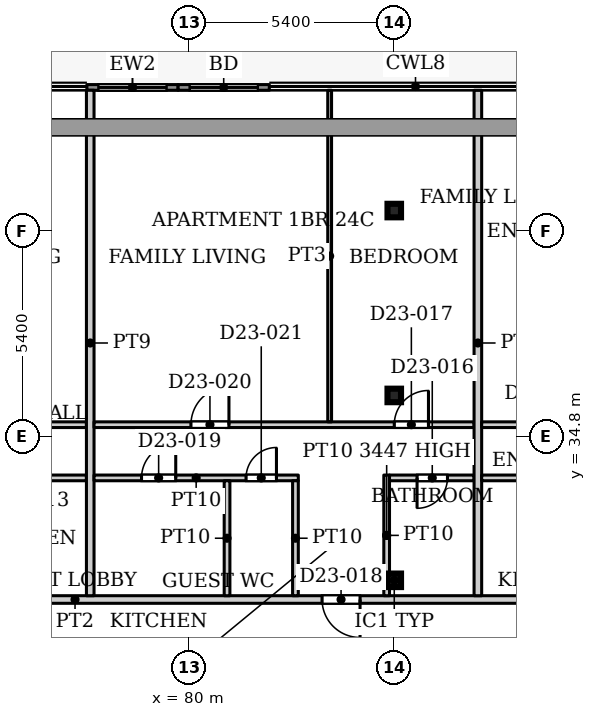
"""IFC4 building model, lengths in metres.
Left out: names, types, materials, properties, quantities, classifications, styles, units other than length and angle.
Written with IfcOpenShell. Run it as: python <this file> out.ifc"""

import sys

from ifc_helpers import new_model, si_unit, direction, frame, frame_2d, origin, origin_2d, place, context, subcontext, project, spatial, rectangle, hollow_rectangle, extrude, source, transform, mapped, element, fill, save


model = new_model("IFC4")
c1 = context("Model", 3, precision=1e-05, world=origin(), true_north=direction((0.0, 1.0)))
c2 = subcontext(c1, "Body", "Model", "MODEL_VIEW")
j1 = project(units=[si_unit("LENGTHUNIT", "METRE"), si_unit("PLANEANGLEUNIT", "RADIAN")], contexts=[c1])
p1 = place(None, origin())
s1 = spatial("IfcSite", under=j1, at=p1, CompositionType="ELEMENT")
p2 = place(p1, origin())
s2 = spatial("IfcBuilding", under=s1, at=p2, CompositionType="ELEMENT")
p3 = place(p2, frame((0.0, 0.0, 105.8)))
s3 = spatial("IfcBuildingStorey", under=s2, at=p3, CompositionType="ELEMENT", Elevation=105.8)
for number, where, z_axis, x_axis in (
    (1, (85.4, 31.005, 0.0), (0.0, 0.0, 1.0), (1.0, 0.0, 0.0)),
    (2, (85.4, 35.87, 0.0), (0.0, 0.0, 1.0), (1.0, 0.0, 0.0)),
    (3, (85.4, 40.735, 0.0), (0.0, 0.0, 1.0), (1.0, 0.0, 0.0)),
):
    element("IfcColumn", number, at=place(p3, frame(where, z_axis=z_axis, x_axis=x_axis)), inside=s3, PredefinedType="COLUMN", context=c2, shape_type="SweptSolid", body=[
        extrude(hollow_rectangle(XDim=0.356, YDim=0.356, WallThickness=0.016, InnerFilletRadius=0.016, OuterFilletRadius=0.032, at=origin_2d()), origin(), (0.0, 0.0, 1.0), 3.9),
    ])
p4 = place(p3, frame((77.312, 43.975, 0.0), z_axis=(0.0, 0.0, 1.0), x_axis=(1.0, 0.0, 0.0)))
e4 = element("IfcWall", 4, at=p4, inside=s3, PredefinedType="SOLIDWALL", context=c2, shape_type="SweptSolid", body=[
    extrude(rectangle(XDim=2.4, YDim=0.15, at=frame_2d((1.2, 0.0))), origin(), (0.0, 0.0, 1.0), 3.75),
])
p5 = place(p4, frame((0.3, 0.0, 0.0)))
e5 = element("IfcOpeningElement", 5, at=p5, cuts=e4, PredefinedType="OPENING", context=c2, shape_type="SweptSolid", body=[
    extrude(rectangle(XDim=1.8, YDim=2.4, at=frame_2d((0.9, 1.2))), frame((0.0, 0.085, 0.0), z_axis=(0.0, -1.0, 0.0), x_axis=(1.0, 0.0, 0.0)), (0.0, 0.0, 1.0), 0.17),
])
p6 = place(p3, frame((79.712, 43.975, 0.0), z_axis=(0.0, 0.0, 1.0), x_axis=(1.0, 0.0, 0.0)))
e6 = element("IfcWall", 6, at=p6, inside=s3, PredefinedType="SOLIDWALL", context=c2, shape_type="SweptSolid", body=[
    extrude(rectangle(XDim=2.4, YDim=0.15, at=frame_2d((1.2, 0.0))), origin(), (0.0, 0.0, 1.0), 3.75),
])
p7 = place(p6, frame((0.3, 0.0, 0.0)))
e7 = element("IfcOpeningElement", 7, at=p7, cuts=e6, PredefinedType="OPENING", context=c2, shape_type="SweptSolid", body=[
    extrude(rectangle(XDim=1.8, YDim=2.4, at=frame_2d((0.9, 1.2))), frame((0.0, 0.085, 0.0), z_axis=(0.0, -1.0, 0.0), x_axis=(1.0, 0.0, 0.0)), (0.0, 0.0, 1.0), 0.17),
])
p8 = place(p3, frame((55.9, 30.5, 0.0), z_axis=(0.0, 0.0, 1.0), x_axis=(1.0, 0.0, 0.0)))
e8 = element("IfcWall", 8, at=p8, inside=s3, PredefinedType="PARTITIONING", context=c2, shape_type="SweptSolid", body=[
    extrude(rectangle(XDim=42.2, YDim=0.2, at=frame_2d((21.1, 0.0))), origin(), (0.0, 0.0, 1.0), 3.6),
])
p9 = place(p8, frame((10.35, 0.0, 0.0)))
e9 = element("IfcOpeningElement", 9, at=p9, cuts=e8, PredefinedType="OPENING", context=c2, shape_type="SweptSolid", body=[
    extrude(rectangle(XDim=1.0, YDim=2.1, at=frame_2d((0.5, 1.05))), frame((0.0, 0.11, 0.0), z_axis=(0.0, -1.0, 0.0), x_axis=(1.0, 0.0, 0.0)), (0.0, 0.0, 1.0), 0.22),
])
p10 = place(p8, frame((16.65, 0.0, 0.0)))
e10 = element("IfcOpeningElement", 10, at=p10, cuts=e8, PredefinedType="OPENING", context=c2, shape_type="SweptSolid", body=[
    extrude(rectangle(XDim=1.0, YDim=2.1, at=frame_2d((0.5, 1.05))), frame((0.0, 0.11, 0.0), z_axis=(0.0, -1.0, 0.0), x_axis=(1.0, 0.0, 0.0)), (0.0, 0.0, 1.0), 0.22),
])
p11 = place(p8, frame((27.6, 0.0, 0.0)))
e11 = element("IfcOpeningElement", 11, at=p11, cuts=e8, PredefinedType="OPENING", context=c2, shape_type="SweptSolid", body=[
    extrude(rectangle(XDim=1.0, YDim=2.1, at=frame_2d((0.5, 1.05))), frame((0.0, 0.11, 0.0), z_axis=(0.0, -1.0, 0.0), x_axis=(1.0, 0.0, 0.0)), (0.0, 0.0, 1.0), 0.22),
])
p12 = place(p8, frame((36.0, 0.0, 0.0)))
e12 = element("IfcOpeningElement", 12, at=p12, cuts=e8, PredefinedType="OPENING", context=c2, shape_type="SweptSolid", body=[
    extrude(rectangle(XDim=1.0, YDim=2.1, at=frame_2d((0.5, 1.05))), frame((0.0, 0.11, 0.0), z_axis=(0.0, -1.0, 0.0), x_axis=(1.0, 0.0, 0.0)), (0.0, 0.0, 1.0), 0.22),
])
p13 = place(p3, frame((67.9, 35.1, 0.0), z_axis=(0.0, 0.0, 1.0), x_axis=(1.0, 0.0, 0.0)))
e13 = element("IfcWall", 13, at=p13, inside=s3, PredefinedType="PARTITIONING", context=c2, shape_type="SweptSolid", body=[
    extrude(rectangle(XDim=9.4, YDim=0.15, at=frame_2d((4.7, 0.0))), origin(), (0.0, 0.0, 1.0), 3.6),
])
p14 = place(p13, frame((1.4, 0.0, 0.0)))
e14 = element("IfcOpeningElement", 14, at=p14, cuts=e13, PredefinedType="OPENING", context=c2, shape_type="SweptSolid", body=[
    extrude(rectangle(XDim=0.9, YDim=2.1, at=frame_2d((0.45, 1.05))), frame((0.0, 0.085, 0.0), z_axis=(0.0, -1.0, 0.0), x_axis=(1.0, 0.0, 0.0)), (0.0, 0.0, 1.0), 0.17),
])
p15 = place(p13, frame((6.15, 0.0, 0.0)))
e15 = element("IfcOpeningElement", 15, at=p15, cuts=e13, PredefinedType="OPENING", context=c2, shape_type="SweptSolid", body=[
    extrude(rectangle(XDim=1.0, YDim=2.1, at=frame_2d((0.5, 1.05))), frame((0.0, 0.085, 0.0), z_axis=(0.0, -1.0, 0.0), x_axis=(1.0, 0.0, 0.0)), (0.0, 0.0, 1.0), 0.17),
])
p16 = place(p3, frame((74.05, 33.7, 0.0), z_axis=(0.0, 0.0, 1.0), x_axis=(1.0, 0.0, 0.0)))
e16 = element("IfcWall", 16, at=p16, inside=s3, PredefinedType="PARTITIONING", context=c2, shape_type="SweptSolid", body=[
    extrude(rectangle(XDim=3.25, YDim=0.15, at=frame_2d((1.625, 0.0))), origin(), (0.0, 0.0, 1.0), 3.6),
])
p17 = place(p16, frame((1.25, 0.0, 0.0)))
e17 = element("IfcOpeningElement", 17, at=p17, cuts=e16, PredefinedType="OPENING", context=c2, shape_type="SweptSolid", body=[
    extrude(rectangle(XDim=0.9, YDim=2.1, at=frame_2d((0.45, 1.05))), frame((0.0, 0.085, 0.0), z_axis=(0.0, -1.0, 0.0), x_axis=(1.0, 0.0, 0.0)), (0.0, 0.0, 1.0), 0.17),
])
p18 = place(p3, frame((77.4, 30.6, 0.0), z_axis=(0.0, 0.0, 1.0), x_axis=(0.0, 1.0, 0.0)))
e18 = element("IfcWall", 18, at=p18, inside=s3, PredefinedType="PARTITIONING", context=c2, shape_type="SweptSolid", body=[
    extrude(rectangle(XDim=13.3, YDim=0.2, at=frame_2d((6.65, 0.0))), origin(), (0.0, 0.0, 1.0), 3.6),
])
p19 = place(p3, frame((77.5, 33.7, 0.0), z_axis=(0.0, 0.0, 1.0), x_axis=(1.0, 0.0, 0.0)))
e19 = element("IfcWall", 19, at=p19, inside=s3, PredefinedType="PARTITIONING", context=c2, shape_type="SweptSolid", body=[
    extrude(rectangle(XDim=5.375, YDim=0.15, at=frame_2d((2.688, 0.0))), origin(), (0.0, 0.0, 1.0), 3.6),
])
p20 = place(p19, frame((1.25, 0.0, 0.0)))
e20 = element("IfcOpeningElement", 20, at=p20, cuts=e19, PredefinedType="OPENING", context=c2, shape_type="SweptSolid", body=[
    extrude(rectangle(XDim=0.9, YDim=2.1, at=frame_2d((0.45, 1.05))), frame((0.0, 0.085, 0.0), z_axis=(0.0, -1.0, 0.0), x_axis=(1.0, 0.0, 0.0)), (0.0, 0.0, 1.0), 0.17),
])
p21 = place(p19, frame((4.0, 0.0, 0.0)))
e21 = element("IfcOpeningElement", 21, at=p21, cuts=e19, PredefinedType="OPENING", context=c2, shape_type="SweptSolid", body=[
    extrude(rectangle(XDim=0.8, YDim=2.1, at=frame_2d((0.4, 1.05))), frame((0.0, 0.085, 0.0), z_axis=(0.0, -1.0, 0.0), x_axis=(1.0, 0.0, 0.0)), (0.0, 0.0, 1.0), 0.17),
])
p22 = place(p3, frame((77.5, 35.1, 0.0), z_axis=(0.0, 0.0, 1.0), x_axis=(1.0, 0.0, 0.0)))
e22 = element("IfcWall", 22, at=p22, inside=s3, PredefinedType="PARTITIONING", context=c2, shape_type="SweptSolid", body=[
    extrude(rectangle(XDim=10.0, YDim=0.15, at=frame_2d((5.0, 0.0))), origin(), (0.0, 0.0, 1.0), 3.6),
])
p23 = place(p22, frame((7.9, 0.0, 0.0)))
e23 = element("IfcOpeningElement", 23, at=p23, cuts=e22, PredefinedType="OPENING", context=c2, shape_type="SweptSolid", body=[
    extrude(rectangle(XDim=0.9, YDim=2.1, at=frame_2d((0.45, 1.05))), frame((0.0, 0.085, 0.0), z_axis=(0.0, -1.0, 0.0), x_axis=(1.0, 0.0, 0.0)), (0.0, 0.0, 1.0), 0.17),
])
p24 = place(p22, frame((2.55, 0.0, 0.0)))
e24 = element("IfcOpeningElement", 24, at=p24, cuts=e22, PredefinedType="OPENING", context=c2, shape_type="SweptSolid", body=[
    extrude(rectangle(XDim=1.0, YDim=2.1, at=frame_2d((0.5, 1.05))), frame((0.0, 0.085, 0.0), z_axis=(0.0, -1.0, 0.0), x_axis=(1.0, 0.0, 0.0)), (0.0, 0.0, 1.0), 0.17),
])
for number, where, z_axis, x_axis in (
    (25, (81.0, 30.6, 0.0), (0.0, 0.0, 1.0), (0.0, 1.0, 0.0)),
    (26, (82.8, 30.6, 0.0), (0.0, 0.0, 1.0), (0.0, 1.0, 0.0)),
):
    element("IfcWall", number, at=place(p3, frame(where, z_axis=z_axis, x_axis=x_axis)), inside=s3, PredefinedType="PARTITIONING", context=c2, shape_type="SweptSolid", body=[
        extrude(rectangle(XDim=3.025, YDim=0.15, at=frame_2d((1.512, 0.0))), origin(), (0.0, 0.0, 1.0), 3.6),
    ])
p25 = place(p3, frame((83.7, 35.175, 0.0), z_axis=(0.0, 0.0, 1.0), x_axis=(0.0, 1.0, 0.0)))
e27 = element("IfcWall", 27, at=p25, inside=s3, PredefinedType="PARTITIONING", context=c2, shape_type="SweptSolid", body=[
    extrude(rectangle(XDim=8.725, YDim=0.1, at=frame_2d((4.362, 0.0))), origin(), (0.0, 0.0, 1.0), 3.6),
])
p26 = place(p3, frame((85.2, 30.6, 0.0), z_axis=(0.0, 0.0, 1.0), x_axis=(0.0, 1.0, 0.0)))
e28 = element("IfcWall", 28, at=p26, inside=s3, PredefinedType="PARTITIONING", context=c2, shape_type="SweptSolid", body=[
    extrude(rectangle(XDim=3.175, YDim=0.15, at=frame_2d((1.587, 0.0))), origin(), (0.0, 0.0, 1.0), 3.447),
])
p27 = place(p3, frame((85.275, 33.7, 0.0), z_axis=(0.0, 0.0, 1.0), x_axis=(1.0, 0.0, 0.0)))
e29 = element("IfcWall", 29, at=p27, inside=s3, PredefinedType="PARTITIONING", context=c2, shape_type="SweptSolid", body=[
    extrude(rectangle(XDim=2.225, YDim=0.15, at=frame_2d((1.113, 0.0))), origin(), (0.0, 0.0, 1.0), 3.6),
])
p28 = place(p27, frame((0.725, 0.0, 0.0)))
e30 = element("IfcOpeningElement", 30, at=p28, cuts=e29, PredefinedType="OPENING", context=c2, shape_type="SweptSolid", body=[
    extrude(rectangle(XDim=0.8, YDim=2.1, at=frame_2d((0.4, 1.05))), frame((0.0, 0.085, 0.0), z_axis=(0.0, -1.0, 0.0), x_axis=(1.0, 0.0, 0.0)), (0.0, 0.0, 1.0), 0.17),
])
p29 = place(p3, frame((87.6, 30.6, 0.0), z_axis=(0.0, 0.0, 1.0), x_axis=(0.0, 1.0, 0.0)))
e31 = element("IfcWall", 31, at=p29, inside=s3, PredefinedType="PARTITIONING", context=c2, shape_type="SweptSolid", body=[
    extrude(rectangle(XDim=13.3, YDim=0.2, at=frame_2d((6.65, 0.0))), origin(), (0.0, 0.0, 1.0), 3.6),
])
p30 = place(p3, frame((87.7, 33.7, 0.0), z_axis=(0.0, 0.0, 1.0), x_axis=(1.0, 0.0, 0.0)))
e32 = element("IfcWall", 32, at=p30, inside=s3, PredefinedType="PARTITIONING", context=c2, shape_type="SweptSolid", body=[
    extrude(rectangle(XDim=3.55, YDim=0.15, at=frame_2d((1.775, 0.0))), origin(), (0.0, 0.0, 1.0), 3.6),
])
p31 = place(p30, frame((1.25, 0.0, 0.0)))
e33 = element("IfcOpeningElement", 33, at=p31, cuts=e32, PredefinedType="OPENING", context=c2, shape_type="SweptSolid", body=[
    extrude(rectangle(XDim=0.9, YDim=2.1, at=frame_2d((0.45, 1.05))), frame((0.0, 0.085, 0.0), z_axis=(0.0, -1.0, 0.0), x_axis=(1.0, 0.0, 0.0)), (0.0, 0.0, 1.0), 0.17),
])
p32 = place(p3, frame((87.7, 35.1, 0.0), z_axis=(0.0, 0.0, 1.0), x_axis=(1.0, 0.0, 0.0)))
e34 = element("IfcWall", 34, at=p32, inside=s3, PredefinedType="PARTITIONING", context=c2, shape_type="SweptSolid", body=[
    extrude(rectangle(XDim=12.2, YDim=0.15, at=frame_2d((6.1, 0.0))), origin(), (0.0, 0.0, 1.0), 3.6),
])
p33 = place(p32, frame((9.8, 0.0, 0.0)))
e35 = element("IfcOpeningElement", 35, at=p33, cuts=e34, PredefinedType="OPENING", context=c2, shape_type="SweptSolid", body=[
    extrude(rectangle(XDim=0.9, YDim=2.1, at=frame_2d((0.45, 1.05))), frame((0.0, 0.085, 0.0), z_axis=(0.0, -1.0, 0.0), x_axis=(1.0, 0.0, 0.0)), (0.0, 0.0, 1.0), 0.17),
])
p34 = place(p32, frame((1.5, 0.0, 0.0)))
e36 = element("IfcOpeningElement", 36, at=p34, cuts=e34, PredefinedType="OPENING", context=c2, shape_type="SweptSolid", body=[
    extrude(rectangle(XDim=1.0, YDim=2.1, at=frame_2d((0.5, 1.05))), frame((0.0, 0.085, 0.0), z_axis=(0.0, -1.0, 0.0), x_axis=(1.0, 0.0, 0.0)), (0.0, 0.0, 1.0), 0.17),
])
p35 = place(p32, frame((6.8, 0.0, 0.0)))
e37 = element("IfcOpeningElement", 37, at=p35, cuts=e34, PredefinedType="OPENING", context=c2, shape_type="SweptSolid", body=[
    extrude(rectangle(XDim=0.9, YDim=2.1, at=frame_2d((0.45, 1.05))), frame((0.0, 0.085, 0.0), z_axis=(0.0, -1.0, 0.0), x_axis=(1.0, 0.0, 0.0)), (0.0, 0.0, 1.0), 0.17),
])
m1 = source(origin(), c2, "Body", "SweptSolid", [
    extrude(rectangle(XDim=1.8, YDim=2.4, at=frame_2d((0.9, 1.2))), frame((0.0, 0.025, 0.0), z_axis=(0.0, -1.0, 0.0), x_axis=(1.0, 0.0, 0.0)), (0.0, 0.0, 1.0), 0.05),
])
p36 = place(p5, origin())
e38 = element("IfcDoor", 38, at=p36, inside=s3, OperationType="SLIDING_TO_LEFT", PredefinedType="DOOR", context=c2, shape_type="MappedRepresentation", body=[
    mapped(m1, transform((0.0, 0.0, 0.0), x_axis=(1.0, 0.0, 0.0), y_axis=(0.0, 1.0, 0.0), z_axis=(0.0, 0.0, 1.0), scale=1.0)),
])
fill(e5, e38)
p37 = place(p7, origin())
e39 = element("IfcDoor", 39, at=p37, inside=s3, OperationType="SLIDING_TO_LEFT", PredefinedType="DOOR", context=c2, shape_type="MappedRepresentation", body=[
    mapped(m1, transform((0.0, 0.0, 0.0), x_axis=(1.0, 0.0, 0.0), y_axis=(0.0, 1.0, 0.0), z_axis=(0.0, 0.0, 1.0), scale=1.0)),
])
fill(e7, e39)
m2 = source(origin(), c2, "Body", "SweptSolid", [
    extrude(rectangle(XDim=0.8, YDim=2.1, at=frame_2d((0.4, 1.05))), frame((0.0, 0.025, 0.0), z_axis=(0.0, -1.0, 0.0), x_axis=(1.0, 0.0, 0.0)), (0.0, 0.0, 1.0), 0.05),
])
p38 = place(p28, origin())
e40 = element("IfcDoor", 40, at=p38, inside=s3, OperationType="SINGLE_SWING_RIGHT", PredefinedType="DOOR", context=c2, shape_type="MappedRepresentation", body=[
    mapped(m2, transform((0.0, 0.0, 0.0), x_axis=(1.0, 0.0, 0.0), y_axis=(0.0, 1.0, 0.0), z_axis=(0.0, 0.0, 1.0), scale=1.0)),
])
fill(e30, e40)
m3 = source(origin(), c2, "Body", "SweptSolid", [
    extrude(rectangle(XDim=0.9, YDim=2.1, at=frame_2d((0.45, 1.05))), frame((0.0, 0.025, 0.0), z_axis=(0.0, -1.0, 0.0), x_axis=(1.0, 0.0, 0.0)), (0.0, 0.0, 1.0), 0.05),
])
p39 = place(p23, origin())
e41 = element("IfcDoor", 41, at=p39, inside=s3, OperationType="SINGLE_SWING_LEFT", PredefinedType="DOOR", context=c2, shape_type="MappedRepresentation", body=[
    mapped(m3, transform((0.0, 0.0, 0.0), x_axis=(1.0, 0.0, 0.0), y_axis=(0.0, 1.0, 0.0), z_axis=(0.0, 0.0, 1.0), scale=1.0)),
])
fill(e23, e41)
m4 = source(origin(), c2, "Body", "SweptSolid", [
    extrude(rectangle(XDim=1.0, YDim=2.1, at=frame_2d((0.5, 1.05))), frame((0.0, 0.025, 0.0), z_axis=(0.0, -1.0, 0.0), x_axis=(1.0, 0.0, 0.0)), (0.0, 0.0, 1.0), 0.05),
])
p40 = place(p11, origin())
e42 = element("IfcDoor", 42, at=p40, inside=s3, OperationType="SINGLE_SWING_RIGHT", PredefinedType="DOOR", context=c2, shape_type="MappedRepresentation", body=[
    mapped(m4, transform((0.0, 0.0, 0.0), x_axis=(1.0, 0.0, 0.0), y_axis=(0.0, 1.0, 0.0), z_axis=(0.0, 0.0, 1.0), scale=1.0)),
])
fill(e11, e42)
p41 = place(p20, origin())
e43 = element("IfcDoor", 43, at=p41, inside=s3, OperationType="SINGLE_SWING_LEFT", PredefinedType="DOOR", context=c2, shape_type="MappedRepresentation", body=[
    mapped(m3, transform((0.0, 0.0, 0.0), x_axis=(1.0, 0.0, 0.0), y_axis=(0.0, 1.0, 0.0), z_axis=(0.0, 0.0, 1.0), scale=1.0)),
])
fill(e20, e43)
m5 = source(origin(), c2, "Body", "SweptSolid", [
    extrude(rectangle(XDim=1.0, YDim=2.1, at=frame_2d((0.5, 1.05))), frame((0.0, 0.025, 0.0), z_axis=(0.0, -1.0, 0.0), x_axis=(1.0, 0.0, 0.0)), (0.0, 0.0, 1.0), 0.05),
])
p42 = place(p24, origin())
e44 = element("IfcDoor", 44, at=p42, inside=s3, OperationType="SINGLE_SWING_LEFT", PredefinedType="DOOR", context=c2, shape_type="MappedRepresentation", body=[
    mapped(m5, transform((0.0, 0.0, 0.0), x_axis=(1.0, 0.0, 0.0), y_axis=(0.0, 1.0, 0.0), z_axis=(0.0, 0.0, 1.0), scale=1.0)),
])
fill(e24, e44)
p43 = place(p21, origin())
e45 = element("IfcDoor", 45, at=p43, inside=s3, OperationType="SINGLE_SWING_LEFT", PredefinedType="DOOR", context=c2, shape_type="MappedRepresentation", body=[
    mapped(m2, transform((0.0, 0.0, 0.0), x_axis=(1.0, 0.0, 0.0), y_axis=(0.0, 1.0, 0.0), z_axis=(0.0, 0.0, 1.0), scale=1.0)),
])
fill(e21, e45)
save(model, sys.argv[1])
